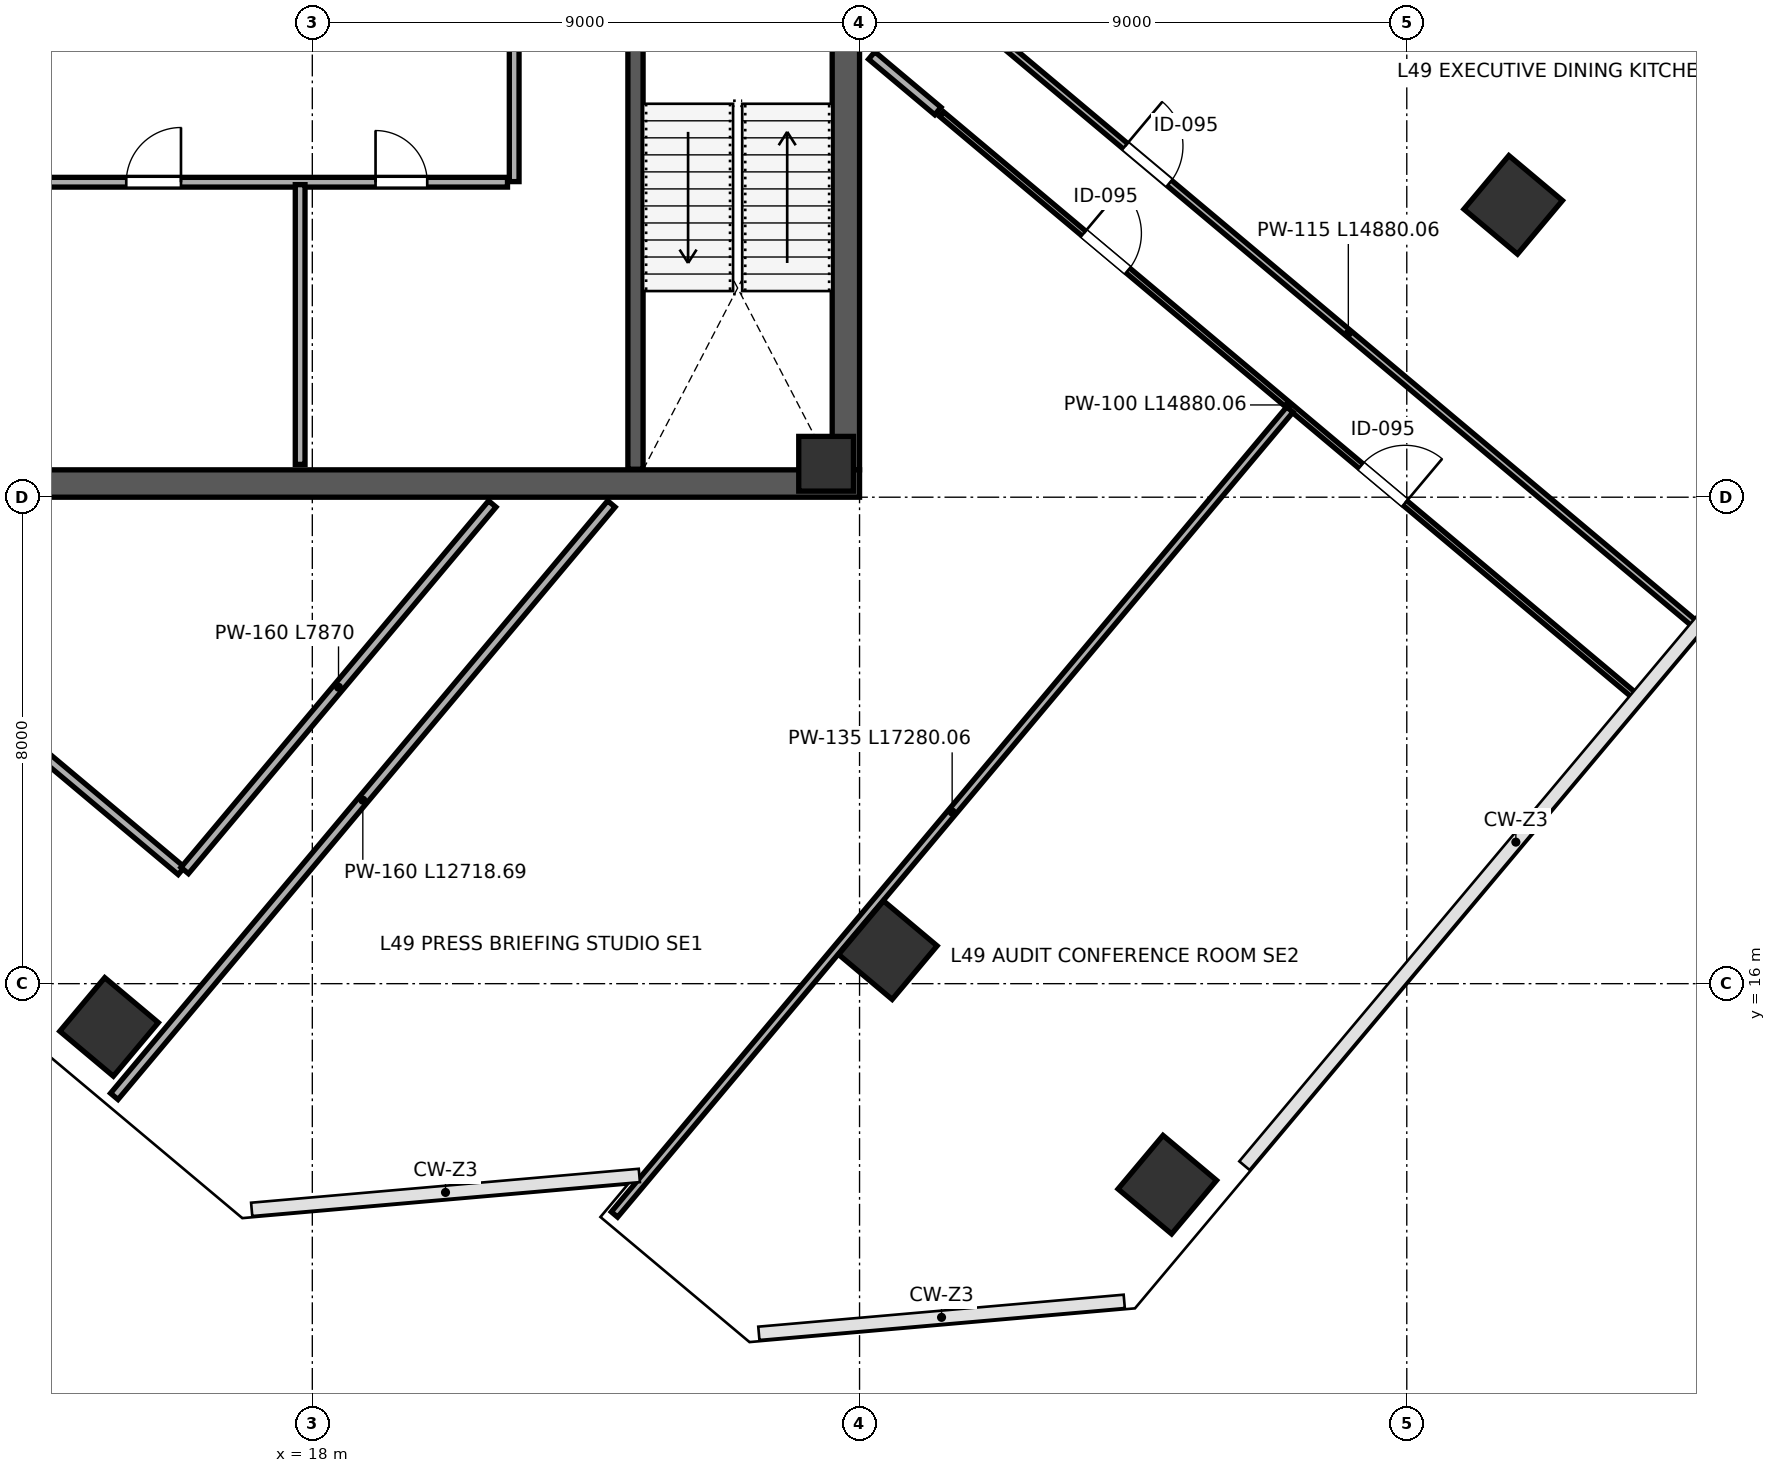
"""IFC4 building model, lengths in metres.
Left out: names, types, materials, properties, quantities, classifications, styles, units other than length and angle.
Written with IfcOpenShell. Run it as: python <this file> out.ifc"""

import sys

from ifc_helpers import new_model, si_unit, direction, frame, frame_2d, origin, origin_2d, place, context, subcontext, project, spatial, rectangle, extrude, source, transform, mapped, element, fill, save


model = new_model("IFC4")
c1 = context("Model", 3, precision=1e-05, world=origin(), true_north=direction((0.0, 1.0)))
c2 = subcontext(c1, "Body", "Model", "MODEL_VIEW")
j1 = project(units=[si_unit("LENGTHUNIT", "METRE"), si_unit("PLANEANGLEUNIT", "RADIAN")], contexts=[c1])
p1 = place(None, origin())
s1 = spatial("IfcSite", under=j1, at=p1, CompositionType="ELEMENT")
p2 = place(p1, origin())
s2 = spatial("IfcBuilding", under=s1, at=p2, CompositionType="ELEMENT")
p3 = place(p2, frame((0.0, 0.0, 220.6)))
s3 = spatial("IfcBuildingStorey", under=s2, at=p3, CompositionType="ELEMENT", Elevation=220.6)
m1 = source(origin(), c2, "Body", "SweptSolid", [
    extrude(rectangle(XDim=0.9, YDim=0.9, at=origin_2d()), origin(), (0.0, 0.0, 1.0), 4.198),
])
p4 = place(p3, frame((26.45, 24.55, 0.001), z_axis=(0.0, 0.0, 1.0), x_axis=(1.0, 0.0, 0.0)))
e1 = element("IfcColumn", 1, at=p4, inside=s3, PredefinedType="COLUMN", context=c2, shape_type="MappedRepresentation", body=[
    mapped(m1, transform((0.0, 0.0, 0.0), scale=1.0)),
])
m2 = source(origin(), c2, "Body", "SweptSolid", [
    extrude(rectangle(XDim=1.15, YDim=1.15, at=origin_2d()), origin(), (0.0, 0.0, 1.0), 4.198),
])
p5 = place(p3, frame((14.657, 15.289, 0.001), z_axis=(0.0, 0.0, 1.0), x_axis=(-0.766044443119, 0.642787609687, 0.0)))
e2 = element("IfcColumn", 2, at=p5, inside=s3, PredefinedType="COLUMN", context=c2, shape_type="MappedRepresentation", body=[
    mapped(m2, transform((0.0, 0.0, 0.0), scale=1.0)),
])
m3 = source(origin(), c2, "Body", "SweptSolid", [
    extrude(rectangle(XDim=1.15, YDim=1.15, at=origin_2d()), origin(), (0.0, 0.0, 1.0), 4.198),
])
for number, where, z_axis, x_axis in (
    (3, (27.465, 16.551, 0.001), (0.0, 0.0, 1.0), (-0.766, 0.643, 0.0)),
    (4, (37.75, 28.808, 0.001), (0.0, 0.0, 1.0), (-0.766, 0.643, 0.0)),
):
    element("IfcColumn", number, at=place(p3, frame(where, z_axis=z_axis, x_axis=x_axis)), inside=s3, PredefinedType="COLUMN", context=c2, shape_type="MappedRepresentation", body=[
        mapped(m3, transform((0.0, 0.0, 0.0), scale=1.0)),
    ])
p6 = place(p3, frame((32.062, 12.695, 0.001), z_axis=(0.0, 0.0, 1.0), x_axis=(-0.766044443119, 0.642787609687, 0.0)))
e5 = element("IfcColumn", 5, at=p6, inside=s3, PredefinedType="COLUMN", context=c2, shape_type="MappedRepresentation", body=[
    mapped(m2, transform((0.0, 0.0, 0.0), scale=1.0)),
])
p7 = place(p3, frame((26.775, 24.45, 0.0), z_axis=(0.0, 0.0, 1.0), x_axis=(0.0, 1.0, 0.0)))
e6 = element("IfcWall", 6, at=p7, inside=s3, PredefinedType="SHEAR", context=c2, shape_type="SweptSolid", body=[
    extrude(rectangle(XDim=15.1, YDim=0.45, at=frame_2d((7.55, 0.0))), origin(), (0.0, 0.0, 1.0), 3.96),
])
p8 = place(p7, frame((8.6, 0.0, 0.0)))
e7 = element("IfcOpeningElement", 7, at=p8, cuts=e6, PredefinedType="OPENING", context=c2, shape_type="SweptSolid", body=[
    extrude(rectangle(XDim=1.15, YDim=2.2, at=frame_2d((0.575, 1.1))), frame((0.0, 0.235, 0.0), z_axis=(0.0, -1.0, 0.0), x_axis=(1.0, 0.0, 0.0)), (0.0, 0.0, 1.0), 0.47),
])
p9 = place(p3, frame((9.0, 24.225, 0.0), z_axis=(0.0, 0.0, 1.0), x_axis=(1.0, 0.0, 0.0)))
e8 = element("IfcWall", 8, at=p9, inside=s3, PredefinedType="SHEAR", context=c2, shape_type="SweptSolid", body=[
    extrude(rectangle(XDim=18.0, YDim=0.45, at=frame_2d((9.0, 0.0))), origin(), (0.0, 0.0, 1.0), 3.96),
])
p10 = place(p3, frame((23.315, 24.46, 0.0), z_axis=(0.0, 0.0, 1.0), x_axis=(0.0, 1.0, 0.0)))
e9 = element("IfcWall", 9, at=p10, inside=s3, PredefinedType="SHEAR", context=c2, shape_type="SweptSolid", body=[
    extrude(rectangle(XDim=7.49, YDim=0.25, at=frame_2d((3.745, 0.0))), origin(), (0.0, 0.0, 1.0), 3.96),
])
p11 = place(p3, frame((12.84, 29.18, 0.0), z_axis=(0.0, 0.0, 1.0), x_axis=(1.0, 0.0, 0.0)))
e10 = element("IfcWall", 10, at=p11, inside=s3, PredefinedType="PARTITIONING", context=c2, shape_type="SweptSolid", body=[
    extrude(rectangle(XDim=8.37, YDim=0.16, at=frame_2d((4.185, 0.0))), origin(), (0.0, 0.0, 1.0), 3.96),
])
p12 = place(p11, frame((2.1, 0.0, 0.0)))
e11 = element("IfcOpeningElement", 11, at=p12, cuts=e10, PredefinedType="OPENING", context=c2, shape_type="SweptSolid", body=[
    extrude(rectangle(XDim=0.9, YDim=2.15, at=frame_2d((0.45, 1.075))), frame((0.0, 0.09, 0.0), z_axis=(0.0, -1.0, 0.0), x_axis=(1.0, 0.0, 0.0)), (0.0, 0.0, 1.0), 0.18),
])
p13 = place(p11, frame((6.2, 0.0, 0.0)))
e12 = element("IfcOpeningElement", 12, at=p13, cuts=e10, PredefinedType="OPENING", context=c2, shape_type="SweptSolid", body=[
    extrude(rectangle(XDim=0.85, YDim=2.1, at=frame_2d((0.425, 1.05))), frame((0.0, 0.09, 0.0), z_axis=(0.0, -1.0, 0.0), x_axis=(1.0, 0.0, 0.0)), (0.0, 0.0, 1.0), 0.18),
])
p14 = place(p3, frame((17.8, 24.54, 0.0), z_axis=(0.0, 0.0, 1.0), x_axis=(0.0, 1.0, 0.0)))
e13 = element("IfcWall", 13, at=p14, inside=s3, PredefinedType="PARTITIONING", context=c2, shape_type="SweptSolid", body=[
    extrude(rectangle(XDim=4.6, YDim=0.16, at=frame_2d((2.3, 0.0))), origin(), (0.0, 0.0, 1.0), 3.96),
])
p15 = place(p3, frame((21.32, 29.19, 0.0), z_axis=(0.0, 0.0, 1.0), x_axis=(0.0, 1.0, 0.0)))
e14 = element("IfcWall", 14, at=p15, inside=s3, PredefinedType="PARTITIONING", context=c2, shape_type="SweptSolid", body=[
    extrude(rectangle(XDim=2.92, YDim=0.16, at=frame_2d((1.46, 0.0))), origin(), (0.0, 0.0, 1.0), 3.96),
])
p16 = place(p3, frame((5.067, 26.9, 0.0), z_axis=(0.0, 0.0, 1.0), x_axis=(0.766049317662, -0.642781800387, 0.0)))
e15 = element("IfcWall", 15, at=p16, inside=s3, PredefinedType="PARTITIONING", context=c2, shape_type="SweptSolid", body=[
    extrude(rectangle(XDim=14.07, YDim=0.16, at=frame_2d((7.035, 0.0))), origin(), (0.0, 0.0, 1.0), 3.96),
])
p17 = place(p16, frame((1.15, 0.0, 0.0)))
e16 = element("IfcOpeningElement", 16, at=p17, cuts=e15, PredefinedType="OPENING", context=c2, shape_type="SweptSolid", body=[
    extrude(rectangle(XDim=0.95, YDim=2.15, at=frame_2d((0.475, 1.075))), frame((0.0, 0.09, 0.0), z_axis=(0.0, -1.0, 0.0), x_axis=(1.0, 0.0, 0.0)), (0.0, 0.0, 1.0), 0.18),
])
p18 = place(p3, frame((15.902, 17.861, 0.0), z_axis=(0.0, 0.0, 1.0), x_axis=(0.642774387864, 0.766055537351, 0.0)))
e17 = element("IfcWall", 17, at=p18, inside=s3, PredefinedType="PARTITIONING", context=c2, shape_type="SweptSolid", body=[
    extrude(rectangle(XDim=7.87, YDim=0.16, at=frame_2d((3.935, 0.0))), origin(), (0.0, 0.0, 1.0), 3.96),
])
p19 = place(p3, frame((27.2, 31.264, 0.0), z_axis=(0.0, 0.0, 1.0), x_axis=(0.766046809659, -0.642784789344, 0.0)))
e18 = element("IfcWall", 18, at=p19, inside=s3, PredefinedType="PARTITIONING", context=c2, shape_type="SweptSolid", body=[
    extrude(rectangle(XDim=1.42, YDim=0.16, at=frame_2d((0.71, 0.0))), origin(), (0.0, 0.0, 1.0), 3.96),
])
p20 = place(p3, frame((14.743, 14.146, 0.0), z_axis=(0.0, 0.0, 1.0), x_axis=(0.642789996784, 0.7660424401, 0.0)))
e19 = element("IfcWall", 19, at=p20, inside=s3, PredefinedType="PARTITIONING", context=c2, shape_type="SweptSolid", body=[
    extrude(rectangle(XDim=12.719, YDim=0.16, at=frame_2d((6.359, 0.0))), origin(), (0.0, 0.0, 1.0), 3.96),
])
p21 = place(p3, frame((29.339, 31.479, 0.0), z_axis=(0.0, 0.0, 1.0), x_axis=(0.766048981681, -0.6427822008, 0.0)))
e20 = element("IfcWall", 20, at=p21, inside=s3, PredefinedType="PARTITIONING", context=c2, shape_type="SweptSolid", body=[
    extrude(rectangle(XDim=14.88, YDim=0.115, at=frame_2d((7.44, 0.0))), origin(), (0.0, 0.0, 1.0), 3.96),
])
p22 = place(p21, frame((2.65, 0.0, 0.0)))
e21 = element("IfcOpeningElement", 21, at=p22, cuts=e20, PredefinedType="OPENING", context=c2, shape_type="SweptSolid", body=[
    extrude(rectangle(XDim=0.95, YDim=2.15, at=frame_2d((0.475, 1.075))), frame((0.0, 0.067, 0.0), z_axis=(0.0, -1.0, 0.0), x_axis=(1.0, 0.0, 0.0)), (0.0, 0.0, 1.0), 0.135),
])
p23 = place(p3, frame((28.349, 30.3, 0.0), z_axis=(0.0, 0.0, 1.0), x_axis=(0.766042202636, -0.642790279781, 0.0)))
e22 = element("IfcWall", 22, at=p23, inside=s3, PredefinedType="PARTITIONING", context=c2, shape_type="SweptSolid", body=[
    extrude(rectangle(XDim=14.88, YDim=0.1, at=frame_2d((7.44, 0.0))), origin(), (0.0, 0.0, 1.0), 3.96),
])
p24 = place(p23, frame((3.05, 0.0, 0.0)))
e23 = element("IfcOpeningElement", 23, at=p24, cuts=e22, PredefinedType="OPENING", context=c2, shape_type="SweptSolid", body=[
    extrude(rectangle(XDim=0.95, YDim=2.15, at=frame_2d((0.475, 1.075))), frame((0.0, 0.06, 0.0), z_axis=(0.0, -1.0, 0.0), x_axis=(1.0, 0.0, 0.0)), (0.0, 0.0, 1.0), 0.12),
])
p25 = place(p23, frame((9.0, 0.0, 0.0)))
e24 = element("IfcOpeningElement", 24, at=p25, cuts=e22, PredefinedType="OPENING", context=c2, shape_type="SweptSolid", body=[
    extrude(rectangle(XDim=0.95, YDim=2.15, at=frame_2d((0.475, 1.075))), frame((0.0, 0.06, 0.0), z_axis=(0.0, -1.0, 0.0), x_axis=(1.0, 0.0, 0.0)), (0.0, 0.0, 1.0), 0.12),
])
p26 = place(p3, frame((22.969, 12.204, 0.0), z_axis=(0.0, 0.0, 1.0), x_axis=(0.642787758903, 0.766044317912, 0.0)))
e25 = element("IfcWall", 25, at=p26, inside=s3, PredefinedType="PARTITIONING", context=c2, shape_type="SweptSolid", body=[
    extrude(rectangle(XDim=17.28, YDim=0.135, at=frame_2d((8.64, 0.0))), origin(), (0.0, 0.0, 1.0), 3.96),
])
m4 = source(origin(), c2, "Body", "SweptSolid", [
    extrude(rectangle(XDim=0.9, YDim=2.15, at=frame_2d((0.45, 1.075))), frame((0.0, 0.025, 0.0), z_axis=(0.0, -1.0, 0.0), x_axis=(1.0, 0.0, 0.0)), (0.0, 0.0, 1.0), 0.05),
])
p27 = place(p12, origin())
e26 = element("IfcDoor", 26, at=p27, inside=s3, OperationType="SINGLE_SWING_RIGHT", PredefinedType="DOOR", context=c2, shape_type="MappedRepresentation", body=[
    mapped(m4, transform((0.0, 0.0, 0.0), scale=1.0)),
])
fill(e11, e26)
m5 = source(origin(), c2, "Body", "SweptSolid", [
    extrude(rectangle(XDim=0.85, YDim=2.1, at=frame_2d((0.425, 1.05))), frame((0.0, 0.025, 0.0), z_axis=(0.0, -1.0, 0.0), x_axis=(1.0, 0.0, 0.0)), (0.0, 0.0, 1.0), 0.05),
])
p28 = place(p13, origin())
e27 = element("IfcDoor", 27, at=p28, inside=s3, OperationType="SINGLE_SWING_LEFT", PredefinedType="DOOR", context=c2, shape_type="MappedRepresentation", body=[
    mapped(m5, transform((0.0, 0.0, 0.0), scale=1.0)),
])
fill(e12, e27)
m6 = source(origin(), c2, "Body", "SweptSolid", [
    extrude(rectangle(XDim=0.95, YDim=2.15, at=frame_2d((0.475, 1.075))), frame((0.0, 0.025, 0.0), z_axis=(0.0, -1.0, 0.0), x_axis=(1.0, 0.0, 0.0)), (0.0, 0.0, 1.0), 0.05),
])
p29 = place(p22, origin())
e28 = element("IfcDoor", 28, at=p29, inside=s3, OperationType="SINGLE_SWING_LEFT", PredefinedType="DOOR", context=c2, shape_type="MappedRepresentation", body=[
    mapped(m6, transform((0.0, 0.0, 0.0), scale=1.0)),
])
fill(e21, e28)
p30 = place(p24, origin())
e29 = element("IfcDoor", 29, at=p30, inside=s3, OperationType="SINGLE_SWING_LEFT", PredefinedType="DOOR", context=c2, shape_type="MappedRepresentation", body=[
    mapped(m6, transform((0.0, 0.0, 0.0), scale=1.0)),
])
fill(e23, e29)
p31 = place(p25, origin())
e30 = element("IfcDoor", 30, at=p31, inside=s3, OperationType="SINGLE_SWING_RIGHT", PredefinedType="DOOR", context=c2, shape_type="MappedRepresentation", body=[
    mapped(m6, transform((0.0, 0.0, 0.0), scale=1.0)),
])
fill(e24, e30)
save(model, sys.argv[1])
